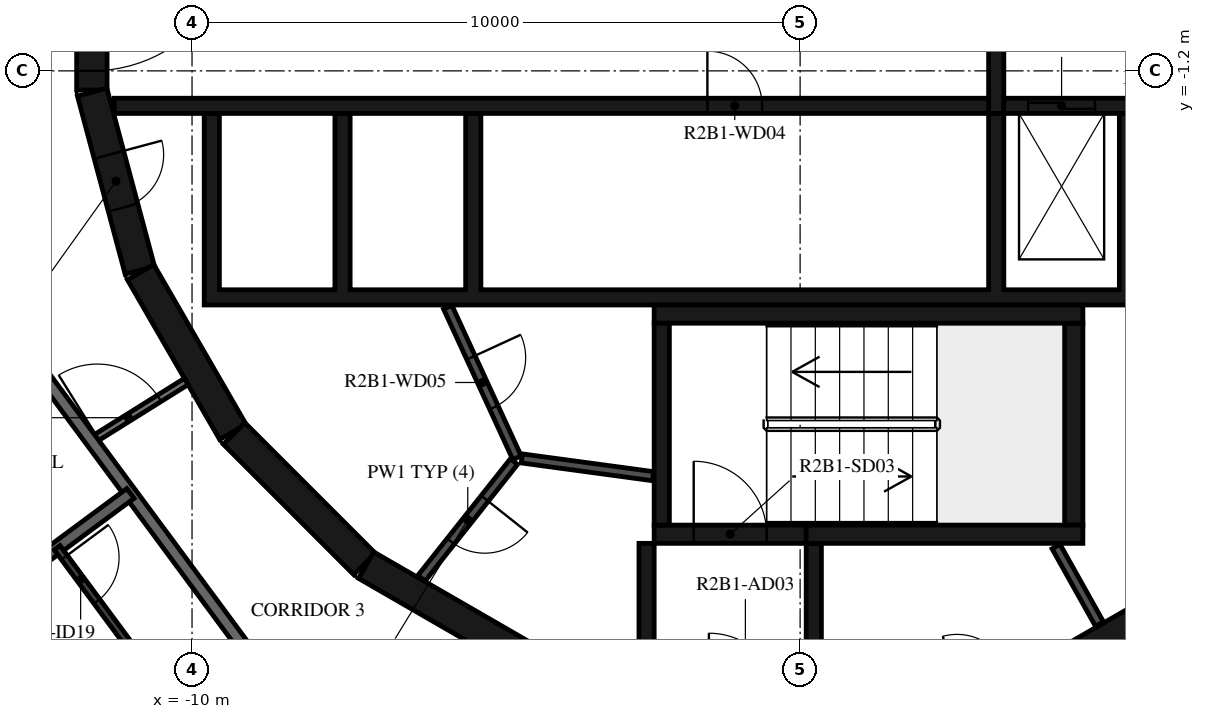
"""IFC4 building model, lengths in metres.
Left out: names, types, materials, properties, quantities, classifications, styles, units other than length and angle.
Written with IfcOpenShell. Run it as: python <this file> out.ifc"""

import sys

from ifc_helpers import new_model, si_unit, direction, frame, frame_2d, origin, place, context, subcontext, project, spatial, polyline, rectangle, outline, extrude, element, fill, save


model = new_model("IFC4")
c1 = context("Model", 3, precision=1e-05, world=origin(), true_north=direction((0.0, 1.0)))
c2 = subcontext(c1, "Body", "Model", "MODEL_VIEW")
j1 = project(units=[si_unit("LENGTHUNIT", "METRE"), si_unit("PLANEANGLEUNIT", "RADIAN")], contexts=[c1])
p1 = place(None, origin())
s1 = spatial("IfcSite", under=j1, at=p1, CompositionType="ELEMENT")
p2 = place(p1, origin())
s2 = spatial("IfcBuilding", under=s1, at=p2, CompositionType="ELEMENT")
p3 = place(p2, frame((0.0, 0.0, 87.2)))
s3 = spatial("IfcBuildingStorey", under=s2, at=p3, CompositionType="ELEMENT", Elevation=87.2)
p4 = place(p3, frame((4.51, -10.845, 0.0), z_axis=(0.0, 0.0, 1.0), x_axis=(0.865975092491, 0.500087131594, 0.0)))
e1 = element("IfcWall", 1, at=p4, inside=s3, PredefinedType="SHEAR", context=c2, shape_type="SweptSolid", body=[
    extrude(rectangle(XDim=3.033, YDim=0.5, at=frame_2d((1.516, 0.0))), origin(), (0.0, 0.0, 1.0), 3.12),
])
p5 = place(p3, frame((-11.647, 1.516, 0.0), z_axis=(0.0, 0.0, 1.0), x_axis=(0.0, -1.0, 0.0)))
e2 = element("IfcWall", 2, at=p5, inside=s3, PredefinedType="SHEAR", context=c2, shape_type="SweptSolid", body=[
    extrude(rectangle(XDim=3.033, YDim=0.5, at=frame_2d((1.516, 0.0))), origin(), (0.0, 0.0, 1.0), 3.12),
])
p6 = place(p5, frame((0.316, 0.0, 0.0)))
e3 = element("IfcOpeningElement", 3, at=p6, cuts=e2, PredefinedType="OPENING", context=c2, shape_type="SweptSolid", body=[
    extrude(rectangle(XDim=2.4, YDim=2.1, at=frame_2d((1.2, 1.05))), frame((0.0, 0.26, 0.0), z_axis=(0.0, -1.0, 0.0), x_axis=(1.0, 0.0, 0.0)), (0.0, 0.0, 1.0), 0.52),
])
p7 = place(p3, frame((-11.643, -1.55, 0.0), z_axis=(0.0, 0.0, 1.0), x_axis=(0.258734743916, -0.965948410781, 0.0)))
e4 = element("IfcWall", 4, at=p7, inside=s3, PredefinedType="SHEAR", context=c2, shape_type="SweptSolid", body=[
    extrude(rectangle(XDim=3.033, YDim=0.5, at=frame_2d((1.516, 0.0))), origin(), (0.0, 0.0, 1.0), 3.12),
])
p8 = place(p7, frame((1.066, 0.0, 0.0)))
e5 = element("IfcOpeningElement", 5, at=p8, cuts=e4, PredefinedType="OPENING", context=c2, shape_type="SweptSolid", body=[
    extrude(rectangle(XDim=0.9, YDim=2.1, at=frame_2d((0.45, 1.05))), frame((0.0, 0.26, 0.0), z_axis=(0.0, -1.0, 0.0), x_axis=(1.0, 0.0, 0.0)), (0.0, 0.0, 1.0), 0.52),
])
p9 = place(p3, frame((-10.845, -4.51, 0.0), z_axis=(0.0, 0.0, 1.0), x_axis=(0.500087131594, -0.865975092491, 0.0)))
e6 = element("IfcWall", 6, at=p9, inside=s3, PredefinedType="SHEAR", context=c2, shape_type="SweptSolid", body=[
    extrude(rectangle(XDim=3.033, YDim=0.5, at=frame_2d((1.516, 0.0))), origin(), (0.0, 0.0, 1.0), 3.12),
])
p10 = place(p3, frame((-9.308, -7.164, 0.0), z_axis=(0.0, 0.0, 1.0), x_axis=(0.707106781187, -0.707106781187, 0.0)))
e7 = element("IfcWall", 7, at=p10, inside=s3, PredefinedType="SHEAR", context=c2, shape_type="SweptSolid", body=[
    extrude(rectangle(XDim=3.032, YDim=0.5, at=frame_2d((1.516, 0.0))), origin(), (0.0, 0.0, 1.0), 3.12),
])
p11 = place(p3, frame((-7.137, -9.329, 0.0), z_axis=(0.0, 0.0, 1.0), x_axis=(0.865975092491, -0.500087131594, 0.0)))
e8 = element("IfcWall", 8, at=p11, inside=s3, PredefinedType="SHEAR", context=c2, shape_type="SweptSolid", body=[
    extrude(rectangle(XDim=3.033, YDim=0.5, at=frame_2d((1.516, 0.0))), origin(), (0.0, 0.0, 1.0), 3.12),
])
p12 = place(p3, frame((-2.275, -8.67, 0.0), z_axis=(0.0, 0.0, 1.0), x_axis=(0.0, 1.0, 0.0)))
e9 = element("IfcWall", 9, at=p12, inside=s3, PredefinedType="SHEAR", context=c2, shape_type="SweptSolid", body=[
    extrude(rectangle(XDim=3.32, YDim=0.25, at=frame_2d((1.66, 0.0))), origin(), (0.0, 0.0, 1.0), 3.12),
])
p13 = place(p3, frame((-2.4, -5.2, 0.0), z_axis=(0.0, 0.0, 1.0), x_axis=(1.0, 0.0, 0.0)))
e10 = element("IfcWall", 10, at=p13, inside=s3, PredefinedType="SHEAR", context=c2, shape_type="SweptSolid", body=[
    extrude(rectangle(XDim=7.05, YDim=0.3, at=frame_2d((3.525, 0.0))), origin(), (0.0, 0.0, 1.0), 3.12),
])
p14 = place(p3, frame((4.5, -8.67, 0.0), z_axis=(0.0, 0.0, 1.0), x_axis=(0.0, 1.0, 0.0)))
e11 = element("IfcWall", 11, at=p14, inside=s3, PredefinedType="SHEAR", context=c2, shape_type="SweptSolid", body=[
    extrude(rectangle(XDim=3.32, YDim=0.3, at=frame_2d((1.66, 0.0))), origin(), (0.0, 0.0, 1.0), 3.12),
])
p15 = place(p3, frame((0.1, -8.82, 0.0), z_axis=(0.0, 0.0, 1.0), x_axis=(1.0, 0.0, 0.0)))
e12 = element("IfcWall", 12, at=p15, inside=s3, PredefinedType="SHEAR", context=c2, shape_type="SweptSolid", body=[
    extrude(rectangle(XDim=4.55, YDim=0.3, at=frame_2d((2.275, 0.0))), origin(), (0.0, 0.0, 1.0), 3.12),
])
p16 = place(p3, frame((-2.4, -8.82, 0.0), z_axis=(0.0, 0.0, 1.0), x_axis=(1.0, 0.0, 0.0)))
e13 = element("IfcWall", 13, at=p16, inside=s3, PredefinedType="SHEAR", context=c2, shape_type="SweptSolid", body=[
    extrude(rectangle(XDim=2.5, YDim=0.3, at=frame_2d((1.25, 0.0))), origin(), (0.0, 0.0, 1.0), 3.12),
])
p17 = place(p16, frame((0.65, 0.0, 0.0)))
e14 = element("IfcOpeningElement", 14, at=p17, cuts=e13, PredefinedType="OPENING", context=c2, shape_type="SweptSolid", body=[
    extrude(rectangle(XDim=1.2, YDim=2.1, at=frame_2d((0.6, 1.05))), frame((0.0, 0.16, 0.0), z_axis=(0.0, -1.0, 0.0), x_axis=(1.0, 0.0, 0.0)), (0.0, 0.0, 1.0), 0.32),
])
p18 = place(p3, frame((-2.525, -8.97, 0.0), z_axis=(0.0, 0.0, 1.0), x_axis=(0.0, -1.0, 0.0)))
e15 = element("IfcWall", 15, at=p18, inside=s3, PredefinedType="SHEAR", context=c2, shape_type="SweptSolid", body=[
    extrude(rectangle(XDim=2.11, YDim=0.25, at=frame_2d((1.055, 0.0))), origin(), (0.0, 0.0, 1.0), 3.12),
])
p19 = place(p3, frame((0.225, -8.97, 0.0), z_axis=(0.0, 0.0, 1.0), x_axis=(0.0, -1.0, 0.0)))
e16 = element("IfcWall", 16, at=p19, inside=s3, PredefinedType="SHEAR", context=c2, shape_type="SweptSolid", body=[
    extrude(rectangle(XDim=2.41, YDim=0.25, at=frame_2d((1.205, 0.0))), origin(), (0.0, 0.0, 1.0), 3.12),
])
p20 = place(p3, origin())
e17 = element("IfcWall", 17, at=p20, inside=s3, PredefinedType="SHEAR", context=c2, shape_type="SweptSolid", body=[
    extrude(outline(polyline([(9.8, -5.05), (9.8, -4.8), (9.8, -1.9), (9.55, -1.9), (9.55, -4.8), (7.65, -4.8), (7.65, -1.9), (7.4, -1.9), (7.4, -4.8), (5.5, -4.8), (5.5, -1.9), (5.25, -1.9), (5.25, -4.8), (3.35, -4.8), (3.35, -1.9), (3.1, -1.9), (3.1, -4.8), (-5.25, -4.8), (-5.25, -1.9), (-5.5, -1.9), (-5.5, -4.8), (-7.4, -4.8), (-7.4, -1.9), (-7.65, -1.9), (-7.65, -4.8), (-9.55, -4.8), (-9.55, -1.9), (-9.8, -1.9), (-9.8, -4.8), (-9.8, -5.05), (9.8, -5.05)])), origin(), (0.0, 0.0, 1.0), 3.12),
])
p21 = place(p3, frame((-11.28, -1.775, 0.0), z_axis=(0.0, 0.0, 1.0), x_axis=(1.0, 0.0, 0.0)))
e18 = element("IfcWall", 18, at=p21, inside=s3, PredefinedType="SHEAR", context=c2, shape_type="SweptSolid", body=[
    extrude(rectangle(XDim=14.38, YDim=0.25, at=frame_2d((7.19, 0.0))), origin(), (0.0, 0.0, 1.0), 3.12),
])
p22 = place(p21, frame((9.755, 0.0, 0.0)))
e19 = element("IfcOpeningElement", 19, at=p22, cuts=e18, PredefinedType="OPENING", context=c2, shape_type="SweptSolid", body=[
    extrude(rectangle(XDim=0.9, YDim=2.1, at=frame_2d((0.45, 1.05))), frame((0.0, 0.135, 0.0), z_axis=(0.0, -1.0, 0.0), x_axis=(1.0, 0.0, 0.0)), (0.0, 0.0, 1.0), 0.27),
])
p23 = place(p3, frame((3.35, -1.775, 0.0), z_axis=(0.0, 0.0, 1.0), x_axis=(1.0, 0.0, 0.0)))
e20 = element("IfcWall", 20, at=p23, inside=s3, PredefinedType="SHEAR", context=c2, shape_type="SweptSolid", body=[
    extrude(rectangle(XDim=7.93, YDim=0.25, at=frame_2d((3.965, 0.0))), origin(), (0.0, 0.0, 1.0), 3.12),
])
p24 = place(p23, frame((0.4, 0.0, 0.0)))
e21 = element("IfcOpeningElement", 21, at=p24, cuts=e20, PredefinedType="OPENING", context=c2, shape_type="SweptSolid", body=[
    extrude(rectangle(XDim=1.1, YDim=2.4, at=frame_2d((0.55, 1.2))), frame((0.0, 0.135, 0.0), z_axis=(0.0, -1.0, 0.0), x_axis=(1.0, 0.0, 0.0)), (0.0, 0.0, 1.0), 0.27),
])
p25 = place(p23, frame((2.55, 0.0, 0.0)))
e22 = element("IfcOpeningElement", 22, at=p25, cuts=e20, PredefinedType="OPENING", context=c2, shape_type="SweptSolid", body=[
    extrude(rectangle(XDim=1.1, YDim=2.4, at=frame_2d((0.55, 1.2))), frame((0.0, 0.135, 0.0), z_axis=(0.0, -1.0, 0.0), x_axis=(1.0, 0.0, 0.0)), (0.0, 0.0, 1.0), 0.27),
])
p26 = place(p23, frame((4.7, 0.0, 0.0)))
e23 = element("IfcOpeningElement", 23, at=p26, cuts=e20, PredefinedType="OPENING", context=c2, shape_type="SweptSolid", body=[
    extrude(rectangle(XDim=1.1, YDim=2.4, at=frame_2d((0.55, 1.2))), frame((0.0, 0.135, 0.0), z_axis=(0.0, -1.0, 0.0), x_axis=(1.0, 0.0, 0.0)), (0.0, 0.0, 1.0), 0.27),
])
p27 = place(p3, frame((3.225, -1.9, 0.0), z_axis=(0.0, 0.0, 1.0), x_axis=(0.0, 1.0, 0.0)))
e24 = element("IfcWall", 24, at=p27, inside=s3, PredefinedType="SHEAR", context=c2, shape_type="SweptSolid", body=[
    extrude(rectangle(XDim=3.8, YDim=0.25, at=frame_2d((1.9, 0.0))), origin(), (0.0, 0.0, 1.0), 3.12),
])
p28 = place(p3, frame((4.922, -10.296, 0.0), z_axis=(0.0, 0.0, 1.0), x_axis=(-0.48860846254, 0.872503163509, 0.0)))
e25 = element("IfcWall", 25, at=p28, inside=s3, PredefinedType="PARTITIONING", context=c2, shape_type="SweptSolid", body=[
    extrude(rectangle(XDim=1.459, YDim=0.15, at=frame_2d((0.73, 0.0))), origin(), (0.0, 0.0, 1.0), 3.12),
])
p29 = place(p3, frame((-5.795, -5.086, 0.0), z_axis=(0.0, 0.0, 1.0), x_axis=(0.417887867606, -0.908498613157, 0.0)))
e26 = element("IfcWall", 26, at=p29, inside=s3, PredefinedType="PARTITIONING", context=c2, shape_type="SweptSolid", body=[
    extrude(rectangle(XDim=2.726, YDim=0.15, at=frame_2d((1.363, 0.0))), origin(), (0.0, 0.0, 1.0), 3.12),
])
p30 = place(p29, frame((0.913, 0.0, 0.0)))
e27 = element("IfcOpeningElement", 27, at=p30, cuts=e26, PredefinedType="OPENING", context=c2, shape_type="SweptSolid", body=[
    extrude(rectangle(XDim=0.9, YDim=2.1, at=frame_2d((0.45, 1.05))), frame((0.0, 0.085, 0.0), z_axis=(0.0, -1.0, 0.0), x_axis=(1.0, 0.0, 0.0)), (0.0, 0.0, 1.0), 0.17),
])
p31 = place(p3, frame((-4.706, -7.625, 0.0), z_axis=(0.0, 0.0, 1.0), x_axis=(-0.621392599334, -0.783499353856, 0.0)))
e28 = element("IfcWall", 28, at=p31, inside=s3, PredefinedType="PARTITIONING", context=c2, shape_type="SweptSolid", body=[
    extrude(rectangle(XDim=2.447, YDim=0.15, at=frame_2d((1.224, 0.0))), origin(), (0.0, 0.0, 1.0), 3.12),
])
p32 = place(p31, frame((0.774, 0.0, 0.0)))
e29 = element("IfcOpeningElement", 29, at=p32, cuts=e28, PredefinedType="OPENING", context=c2, shape_type="SweptSolid", body=[
    extrude(rectangle(XDim=0.9, YDim=2.1, at=frame_2d((0.45, 1.05))), frame((0.0, 0.085, 0.0), z_axis=(0.0, -1.0, 0.0), x_axis=(1.0, 0.0, 0.0)), (0.0, 0.0, 1.0), 0.17),
])
p33 = place(p3, frame((-2.42, -7.865, 0.0), z_axis=(0.0, 0.0, 1.0), x_axis=(-0.990972299108, 0.134066783362, 0.0)))
e30 = element("IfcWall", 30, at=p33, inside=s3, PredefinedType="PARTITIONING", context=c2, shape_type="SweptSolid", body=[
    extrude(rectangle(XDim=2.176, YDim=0.15, at=frame_2d((1.088, 0.0))), origin(), (0.0, 0.0, 1.0), 3.12),
])
p34 = place(p3, frame((-11.654, -7.282, 0.0), z_axis=(0.0, 0.0, 1.0), x_axis=(0.848117698675, 0.529807860638, 0.0)))
e31 = element("IfcWall", 31, at=p34, inside=s3, PredefinedType="PARTITIONING", context=c2, shape_type="SweptSolid", body=[
    extrude(rectangle(XDim=1.838, YDim=0.12, at=frame_2d((0.919, 0.0))), origin(), (0.0, 0.0, 1.0), 3.12),
])
p35 = place(p34, frame((0.115, 0.0, 0.0)))
e32 = element("IfcOpeningElement", 32, at=p35, cuts=e31, PredefinedType="OPENING", context=c2, shape_type="SweptSolid", body=[
    extrude(rectangle(XDim=1.2, YDim=2.1, at=frame_2d((0.6, 1.05))), frame((0.0, 0.07, 0.0), z_axis=(0.0, -1.0, 0.0), x_axis=(1.0, 0.0, 0.0)), (0.0, 0.0, 1.0), 0.14),
])
for number, where, z_axis, x_axis in (
    (33, (-13.196, -5.198, 0.0), (0.0, 0.0, 1.0), (0.595, -0.804, 0.0)),
    (34, (5.198, -13.196, 0.0), (0.0, 0.0, 1.0), (0.804, 0.595, 0.0)),
):
    element("IfcWall", number, at=place(p3, frame(where, z_axis=z_axis, x_axis=x_axis)), inside=s3, PredefinedType="STANDARD", context=c2, shape_type="SweptSolid", body=[
        extrude(rectangle(XDim=7.342, YDim=0.2, at=frame_2d((3.671, 0.0))), origin(), (0.0, 0.0, 1.0), 3.12),
    ])
p36 = place(p3, frame((-16.649, -12.32, 0.0), z_axis=(0.0, 0.0, 1.0), x_axis=(0.803869204071, 0.594806105169, 0.0)))
e35 = element("IfcWall", 35, at=p36, inside=s3, PredefinedType="STANDARD", context=c2, shape_type="SweptSolid", body=[
    extrude(rectangle(XDim=7.011, YDim=0.2, at=frame_2d((3.506, 0.0))), origin(), (0.0, 0.0, 1.0), 3.12),
])
p37 = place(p3, frame((-12.219, -9.041, 0.0), z_axis=(0.0, 0.0, 1.0), x_axis=(0.59482286703, -0.803856801214, 0.0)))
e36 = element("IfcWall", 36, at=p37, inside=s3, PredefinedType="PARTITIONING", context=c2, shape_type="SweptSolid", body=[
    extrude(rectangle(XDim=2.193, YDim=0.12, at=frame_2d((1.097, 0.0))), origin(), (0.0, 0.0, 1.0), 3.12),
])
p38 = place(p37, frame((0.2, 0.0, 0.0)))
e37 = element("IfcOpeningElement", 37, at=p38, cuts=e36, PredefinedType="OPENING", context=c2, shape_type="SweptSolid", body=[
    extrude(rectangle(XDim=0.9, YDim=2.1, at=frame_2d((0.45, 1.05))), frame((0.0, 0.07, 0.0), z_axis=(0.0, -1.0, 0.0), x_axis=(1.0, 0.0, 0.0)), (0.0, 0.0, 1.0), 0.14),
])
p39 = place(p17, origin())
e38 = element("IfcDoor", 38, at=p39, inside=s3, OperationType="SINGLE_SWING_LEFT", PredefinedType="DOOR", context=c2, shape_type="SweptSolid", body=[
    extrude(rectangle(XDim=1.2, YDim=2.1, at=frame_2d((0.6, 1.05))), frame((0.0, 0.025, 0.0), z_axis=(0.0, -1.0, 0.0), x_axis=(1.0, 0.0, 0.0)), (0.0, 0.0, 1.0), 0.05),
])
fill(e14, e38)
p40 = place(p6, origin())
e39 = element("IfcDoor", 39, at=p40, inside=s3, OperationType="DOUBLE_DOOR_SINGLE_SWING", PredefinedType="DOOR", context=c2, shape_type="SweptSolid", body=[
    extrude(rectangle(XDim=2.4, YDim=2.1, at=frame_2d((1.2, 1.05))), frame((0.0, 0.025, 0.0), z_axis=(0.0, -1.0, 0.0), x_axis=(1.0, 0.0, 0.0)), (0.0, 0.0, 1.0), 0.05),
])
fill(e3, e39)
p41 = place(p24, origin())
e40 = element("IfcDoor", 40, at=p41, inside=s3, OperationType="DOUBLE_DOOR_SLIDING", PredefinedType="DOOR", context=c2, shape_type="SweptSolid", body=[
    extrude(rectangle(XDim=1.1, YDim=2.4, at=frame_2d((0.55, 1.2))), frame((0.0, 0.025, 0.0), z_axis=(0.0, -1.0, 0.0), x_axis=(1.0, 0.0, 0.0)), (0.0, 0.0, 1.0), 0.05),
])
fill(e21, e40)
p42 = place(p22, origin())
e41 = element("IfcDoor", 41, at=p42, inside=s3, OperationType="SINGLE_SWING_LEFT", PredefinedType="DOOR", context=c2, shape_type="SweptSolid", body=[
    extrude(rectangle(XDim=0.9, YDim=2.1, at=frame_2d((0.45, 1.05))), frame((0.0, 0.025, 0.0), z_axis=(0.0, -1.0, 0.0), x_axis=(1.0, 0.0, 0.0)), (0.0, 0.0, 1.0), 0.05),
])
fill(e19, e41)
p43 = place(p30, origin())
e42 = element("IfcDoor", 42, at=p43, inside=s3, OperationType="SINGLE_SWING_RIGHT", PredefinedType="DOOR", context=c2, shape_type="SweptSolid", body=[
    extrude(rectangle(XDim=0.9, YDim=2.1, at=frame_2d((0.45, 1.05))), frame((0.0, 0.025, 0.0), z_axis=(0.0, -1.0, 0.0), x_axis=(1.0, 0.0, 0.0)), (0.0, 0.0, 1.0), 0.05),
])
fill(e27, e42)
p44 = place(p32, origin())
e43 = element("IfcDoor", 43, at=p44, inside=s3, OperationType="SINGLE_SWING_LEFT", PredefinedType="DOOR", context=c2, shape_type="SweptSolid", body=[
    extrude(rectangle(XDim=0.9, YDim=2.1, at=frame_2d((0.45, 1.05))), frame((0.0, 0.025, 0.0), z_axis=(0.0, -1.0, 0.0), x_axis=(1.0, 0.0, 0.0)), (0.0, 0.0, 1.0), 0.05),
])
fill(e29, e43)
p45 = place(p8, origin())
e44 = element("IfcDoor", 44, at=p45, inside=s3, OperationType="SINGLE_SWING_RIGHT", PredefinedType="DOOR", context=c2, shape_type="SweptSolid", body=[
    extrude(rectangle(XDim=0.9, YDim=2.1, at=frame_2d((0.45, 1.05))), frame((0.0, 0.025, 0.0), z_axis=(0.0, -1.0, 0.0), x_axis=(1.0, 0.0, 0.0)), (0.0, 0.0, 1.0), 0.05),
])
fill(e5, e44)
p46 = place(p38, origin())
e45 = element("IfcDoor", 45, at=p46, inside=s3, OperationType="SINGLE_SWING_LEFT", PredefinedType="DOOR", context=c2, shape_type="SweptSolid", body=[
    extrude(rectangle(XDim=0.9, YDim=2.1, at=frame_2d((0.45, 1.05))), frame((0.0, 0.025, 0.0), z_axis=(0.0, -1.0, 0.0), x_axis=(1.0, 0.0, 0.0)), (0.0, 0.0, 1.0), 0.05),
])
fill(e37, e45)
p47 = place(p35, origin())
e46 = element("IfcDoor", 46, at=p47, inside=s3, OperationType="DOUBLE_DOOR_SINGLE_SWING", PredefinedType="DOOR", context=c2, shape_type="SweptSolid", body=[
    extrude(rectangle(XDim=1.2, YDim=2.1, at=frame_2d((0.6, 1.05))), frame((0.0, 0.025, 0.0), z_axis=(0.0, -1.0, 0.0), x_axis=(1.0, 0.0, 0.0)), (0.0, 0.0, 1.0), 0.05),
])
fill(e32, e46)
save(model, sys.argv[1])
